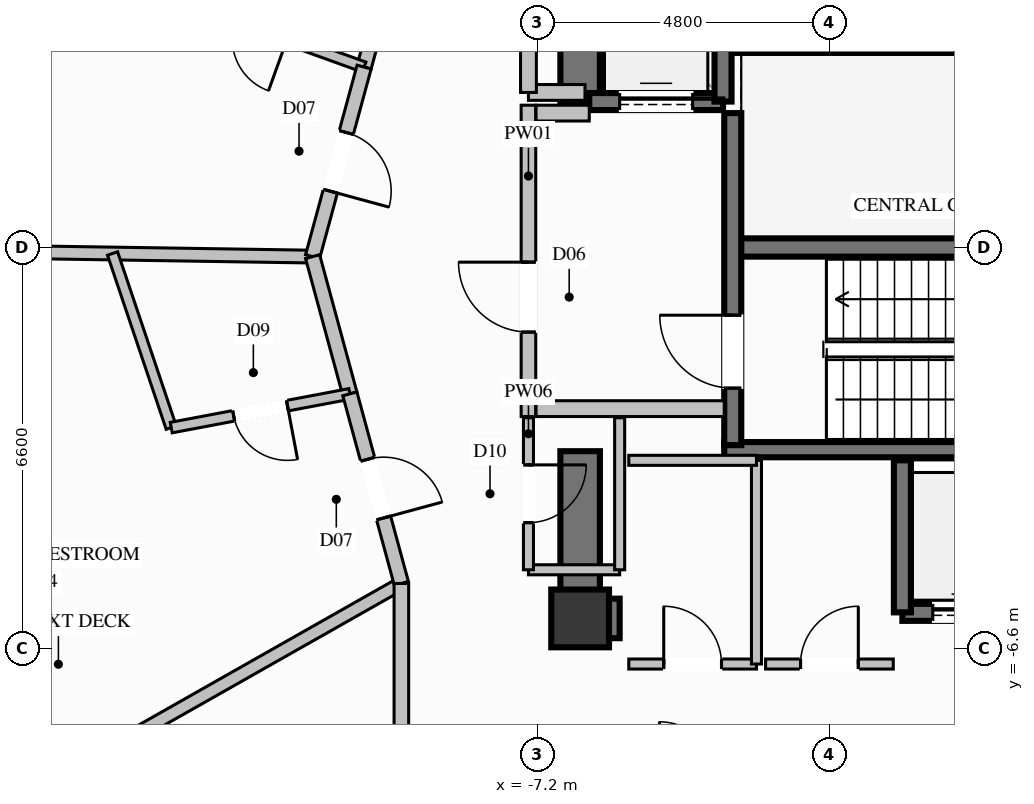
"""IFC4 building model, lengths in metres.
Left out: names, types, materials, properties, quantities, classifications, styles, units other than length and angle.
Written with IfcOpenShell. Run it as: python <this file> out.ifc"""

import sys

from ifc_helpers import new_model, si_unit, direction, frame, frame_2d, origin, origin_2d, place, context, subcontext, project, spatial, rectangle, extrude, element, fill, save


model = new_model("IFC4")
c1 = context("Model", 3, precision=1e-05, world=origin(), true_north=direction((0.0, 1.0)))
c2 = subcontext(c1, "Body", "Model", "MODEL_VIEW")
j1 = project(units=[si_unit("LENGTHUNIT", "METRE"), si_unit("PLANEANGLEUNIT", "RADIAN")], contexts=[c1])
p1 = place(None, origin())
s1 = spatial("IfcSite", under=j1, at=p1, CompositionType="ELEMENT")
p2 = place(p1, origin())
s2 = spatial("IfcBuilding", under=s1, at=p2, CompositionType="ELEMENT")
p3 = place(p2, frame((0.0, 0.0, 149.4)))
s3 = spatial("IfcBuildingStorey", under=s2, at=p3, CompositionType="ELEMENT", Elevation=149.4)
p4 = place(p3, frame((-6.5, -6.1, 0.0), z_axis=(0.0, 0.0, 1.0), x_axis=(1.0, 0.0, 0.0)))
e1 = element("IfcColumn", 1, at=p4, inside=s3, PredefinedType="COLUMN", context=c2, shape_type="SweptSolid", body=[
    extrude(rectangle(XDim=0.95, YDim=0.95, at=origin_2d()), origin(), (0.0, 0.0, 1.0), 3.6),
])
p5 = place(p3, frame((-3.99, 0.0, 0.0), z_axis=(0.0, 0.0, 1.0), x_axis=(1.0, 0.0, 0.0)))
e2 = element("IfcWall", 2, at=p5, inside=s3, PredefinedType="SHEAR", context=c2, shape_type="SweptSolid", body=[
    extrude(rectangle(XDim=7.98, YDim=0.3, at=frame_2d((3.99, 0.0))), origin(), (0.0, 0.0, 1.0), 3.6),
])
for number, where, z_axis, x_axis in (
    (3, (-4.13, -3.325, 0.0), (0.0, 0.0, 1.0), (1.0, 0.0, 0.0)),
    (4, (-4.13, 3.325, 0.0), (0.0, 0.0, 1.0), (1.0, 0.0, 0.0)),
):
    element("IfcWall", number, at=place(p3, frame(where, z_axis=z_axis, x_axis=x_axis)), inside=s3, PredefinedType="SOLIDWALL", context=c2, shape_type="SweptSolid", body=[
        extrude(rectangle(XDim=8.26, YDim=0.25, at=frame_2d((4.13, 0.0))), origin(), (0.0, 0.0, 1.0), 3.6),
    ])
p6 = place(p3, frame((-6.175, -6.1, 0.0), z_axis=(0.0, 0.0, 1.0), x_axis=(1.0, 0.0, 0.0)))
e5 = element("IfcWall", 5, at=p6, inside=s3, PredefinedType="SHEAR", context=c2, shape_type="SweptSolid", body=[
    extrude(rectangle(XDim=0.325, YDim=0.65, at=frame_2d((0.163, 0.0))), origin(), (0.0, 0.0, 1.0), 3.6),
])
p7 = place(p3, frame((-6.5, 2.35, 0.0), z_axis=(0.0, 0.0, 1.0), x_axis=(0.0, 1.0, 0.0)))
e6 = element("IfcWall", 6, at=p7, inside=s3, PredefinedType="SHEAR", context=c2, shape_type="SweptSolid", body=[
    extrude(rectangle(XDim=4.075, YDim=0.65, at=frame_2d((2.038, 0.0))), origin(), (0.0, 0.0, 1.0), 3.6),
])
p8 = place(p3, frame((-6.5, -6.425, 0.0), z_axis=(0.0, 0.0, 1.0), x_axis=(0.0, 1.0, 0.0)))
e7 = element("IfcWall", 7, at=p8, inside=s3, PredefinedType="SHEAR", context=c2, shape_type="SweptSolid", body=[
    extrude(rectangle(XDim=3.075, YDim=0.65, at=frame_2d((1.538, 0.0))), origin(), (0.0, 0.0, 1.0), 3.6),
])
p9 = place(p3, frame((-1.2, -6.0, 0.0), z_axis=(0.0, 0.0, 1.0), x_axis=(1.0, 0.0, 0.0)))
e8 = element("IfcWall", 8, at=p9, inside=s3, PredefinedType="SOLIDWALL", context=c2, shape_type="SweptSolid", body=[
    extrude(rectangle(XDim=2.1, YDim=0.28, at=frame_2d((1.05, 0.0))), origin(), (0.0, 0.0, 1.0), 3.35),
])
p10 = place(p9, frame((0.5, 0.0, 0.0)))
e9 = element("IfcOpeningElement", 9, at=p10, cuts=e8, PredefinedType="OPENING", context=c2, shape_type="SweptSolid", body=[
    extrude(rectangle(XDim=1.1, YDim=2.2, at=frame_2d((0.55, 1.1))), frame((0.0, 0.15, 0.0), z_axis=(0.0, -1.0, 0.0), x_axis=(1.0, 0.0, 0.0)), (0.0, 0.0, 1.0), 0.3),
])
p11 = place(p3, frame((-1.2, -3.5, 0.0), z_axis=(0.0, 0.0, 1.0), x_axis=(0.0, -1.0, 0.0)))
e10 = element("IfcWall", 10, at=p11, inside=s3, PredefinedType="SOLIDWALL", context=c2, shape_type="SweptSolid", body=[
    extrude(rectangle(XDim=2.5, YDim=0.28, at=frame_2d((1.25, 0.0))), origin(), (0.0, 0.0, 1.0), 3.35),
])
p12 = place(p3, frame((-6.35, 2.4, 0.0), z_axis=(0.0, 0.0, 1.0), x_axis=(1.0, 0.0, 0.0)))
e11 = element("IfcWall", 11, at=p12, inside=s3, PredefinedType="SOLIDWALL", context=c2, shape_type="SweptSolid", body=[
    extrude(rectangle(XDim=2.2, YDim=0.28, at=frame_2d((1.1, 0.0))), origin(), (0.0, 0.0, 1.0), 3.35),
])
p13 = place(p12, frame((0.5, 0.0, 0.0)))
e12 = element("IfcOpeningElement", 12, at=p13, cuts=e11, PredefinedType="OPENING", context=c2, shape_type="SweptSolid", body=[
    extrude(rectangle(XDim=1.2, YDim=2.2, at=frame_2d((0.6, 1.1))), frame((0.0, 0.15, 0.0), z_axis=(0.0, -1.0, 0.0), x_axis=(1.0, 0.0, 0.0)), (0.0, 0.0, 1.0), 0.3),
])
p14 = place(p3, frame((-4.15, 2.4, 0.0), z_axis=(0.0, 0.0, 1.0), x_axis=(0.0, 1.0, 0.0)))
e13 = element("IfcWall", 13, at=p14, inside=s3, PredefinedType="SOLIDWALL", context=c2, shape_type="SweptSolid", body=[
    extrude(rectangle(XDim=2.7, YDim=0.28, at=frame_2d((1.35, 0.0))), origin(), (0.0, 0.0, 1.0), 3.35),
])
p15 = place(p3, frame((-3.99, -3.25, 0.0), z_axis=(0.0, 0.0, 1.0), x_axis=(0.0, 1.0, 0.0)))
e14 = element("IfcWall", 14, at=p15, inside=s3, PredefinedType="SOLIDWALL", context=c2, shape_type="SweptSolid", body=[
    extrude(rectangle(XDim=5.46, YDim=0.28, at=frame_2d((2.73, 0.0))), origin(), (0.0, 0.0, 1.0), 3.35),
])
p16 = place(p15, frame((0.937, 0.0, 0.0)))
e15 = element("IfcOpeningElement", 15, at=p16, cuts=e14, PredefinedType="OPENING", context=c2, shape_type="SweptSolid", body=[
    extrude(rectangle(XDim=1.2, YDim=2.2, at=frame_2d((0.6, 1.1))), frame((0.0, 0.15, 0.0), z_axis=(0.0, -1.0, 0.0), x_axis=(1.0, 0.0, 0.0)), (0.0, 0.0, 1.0), 0.3),
])
p17 = place(p3, frame((-7.35, -2.78, 0.0), z_axis=(0.0, 0.0, 1.0), x_axis=(0.0, 1.0, 0.0)))
e16 = element("IfcWall", 16, at=p17, inside=s3, PredefinedType="PARTITIONING", context=c2, shape_type="SweptSolid", body=[
    extrude(rectangle(XDim=5.12, YDim=0.24, at=frame_2d((2.56, 0.0))), origin(), (0.0, 0.0, 1.0), 2.435),
])
p18 = place(p17, frame((1.389, 0.0, 0.0)))
e17 = element("IfcOpeningElement", 17, at=p18, cuts=e16, PredefinedType="OPENING", context=c2, shape_type="SweptSolid", body=[
    extrude(rectangle(XDim=1.15, YDim=2.2, at=frame_2d((0.575, 1.1))), frame((0.0, 0.13, 0.0), z_axis=(0.0, -1.0, 0.0), x_axis=(1.0, 0.0, 0.0)), (0.0, 0.0, 1.0), 0.26),
])
p19 = place(p3, frame((-7.225, -2.65, 0.0), z_axis=(0.0, 0.0, 1.0), x_axis=(1.0, 0.0, 0.0)))
e18 = element("IfcWall", 18, at=p19, inside=s3, PredefinedType="PARTITIONING", context=c2, shape_type="SweptSolid", body=[
    extrude(rectangle(XDim=3.095, YDim=0.26, at=frame_2d((1.548, 0.0))), origin(), (0.0, 0.0, 1.0), 3.35),
])
p20 = place(p3, frame((-7.225, 2.21, 0.0), z_axis=(0.0, 0.0, 1.0), x_axis=(1.0, 0.0, 0.0)))
e19 = element("IfcWall", 19, at=p20, inside=s3, PredefinedType="PARTITIONING", context=c2, shape_type="SweptSolid", body=[
    extrude(rectangle(XDim=0.875, YDim=0.26, at=frame_2d((0.438, 0.0))), origin(), (0.0, 0.0, 1.0), 3.35),
])
p21 = place(p3, frame((-7.35, 2.55, 0.0), z_axis=(0.0, 0.0, 1.0), x_axis=(1.0, 0.0, 0.0)))
e20 = element("IfcWall", 20, at=p21, inside=s3, PredefinedType="PARTITIONING", context=c2, shape_type="SweptSolid", body=[
    extrude(rectangle(XDim=0.93, YDim=0.26, at=frame_2d((0.465, 0.0))), origin(), (0.0, 0.0, 1.0), 3.35),
])
p22 = place(p3, frame((-7.35, 2.55, 0.0), z_axis=(0.0, 0.0, 1.0), x_axis=(0.0, 1.0, 0.0)))
e21 = element("IfcWall", 21, at=p22, inside=s3, PredefinedType="PARTITIONING", context=c2, shape_type="SweptSolid", body=[
    extrude(rectangle(XDim=2.4, YDim=0.26, at=frame_2d((1.2, 0.0))), origin(), (0.0, 0.0, 1.0), 2.435),
])
p23 = place(p22, frame((0.775, 0.0, 0.0)))
e22 = element("IfcOpeningElement", 22, at=p23, cuts=e21, PredefinedType="OPENING", context=c2, shape_type="SweptSolid", body=[
    extrude(rectangle(XDim=0.85, YDim=2.05, at=frame_2d((0.425, 1.025))), frame((0.0, 0.14, 0.0), z_axis=(0.0, -1.0, 0.0), x_axis=(1.0, 0.0, 0.0)), (0.0, 0.0, 1.0), 0.28),
])
p24 = place(p3, frame((-7.35, -5.3, 0.0), z_axis=(0.0, 0.0, 1.0), x_axis=(1.0, 0.0, 0.0)))
e23 = element("IfcWall", 23, at=p24, inside=s3, PredefinedType="PARTITIONING", context=c2, shape_type="SweptSolid", body=[
    extrude(rectangle(XDim=1.5, YDim=0.165, at=frame_2d((0.75, 0.0))), origin(), (0.0, 0.0, 1.0), 2.435),
])
p25 = place(p3, frame((-5.85, -5.3, 0.0), z_axis=(0.0, 0.0, 1.0), x_axis=(0.0, 1.0, 0.0)))
e24 = element("IfcWall", 24, at=p25, inside=s3, PredefinedType="PARTITIONING", context=c2, shape_type="SweptSolid", body=[
    extrude(rectangle(XDim=2.5, YDim=0.165, at=frame_2d((1.25, 0.0))), origin(), (0.0, 0.0, 1.0), 2.435),
])
p26 = place(p3, frame((-7.35, -2.8, 0.0), z_axis=(0.0, 0.0, 1.0), x_axis=(0.0, -1.0, 0.0)))
e25 = element("IfcWall", 25, at=p26, inside=s3, PredefinedType="PARTITIONING", context=c2, shape_type="SweptSolid", body=[
    extrude(rectangle(XDim=2.5, YDim=0.165, at=frame_2d((1.25, 0.0))), origin(), (0.0, 0.0, 1.0), 3.35),
])
p27 = place(p26, frame((0.775, 0.0, 0.0)))
e26 = element("IfcOpeningElement", 26, at=p27, cuts=e25, PredefinedType="OPENING", context=c2, shape_type="SweptSolid", body=[
    extrude(rectangle(XDim=0.95, YDim=2.1, at=frame_2d((0.475, 1.05))), frame((0.0, 0.093, 0.0), z_axis=(0.0, -1.0, 0.0), x_axis=(1.0, 0.0, 0.0)), (0.0, 0.0, 1.0), 0.185),
])
p28 = place(p3, frame((-5.7, -6.85, 0.0), z_axis=(0.0, 0.0, 1.0), x_axis=(1.0, 0.0, 0.0)))
e27 = element("IfcWall", 27, at=p28, inside=s3, PredefinedType="PARTITIONING", context=c2, shape_type="SweptSolid", body=[
    extrude(rectangle(XDim=2.1, YDim=0.165, at=frame_2d((1.05, 0.0))), origin(), (0.0, 0.0, 1.0), 2.435),
])
p29 = place(p28, frame((0.575, 0.0, 0.0)))
e28 = element("IfcOpeningElement", 28, at=p29, cuts=e27, PredefinedType="OPENING", context=c2, shape_type="SweptSolid", body=[
    extrude(rectangle(XDim=0.95, YDim=2.1, at=frame_2d((0.475, 1.05))), frame((0.0, 0.093, 0.0), z_axis=(0.0, -1.0, 0.0), x_axis=(1.0, 0.0, 0.0)), (0.0, 0.0, 1.0), 0.185),
])
p30 = place(p3, frame((-3.6, -6.85, 0.0), z_axis=(0.0, 0.0, 1.0), x_axis=(0.0, 1.0, 0.0)))
e29 = element("IfcWall", 29, at=p30, inside=s3, PredefinedType="PARTITIONING", context=c2, shape_type="SweptSolid", body=[
    extrude(rectangle(XDim=3.35, YDim=0.165, at=frame_2d((1.675, 0.0))), origin(), (0.0, 0.0, 1.0), 3.35),
])
p31 = place(p3, frame((-3.6, -3.5, 0.0), z_axis=(0.0, 0.0, 1.0), x_axis=(-1.0, 0.0, 0.0)))
e30 = element("IfcWall", 30, at=p31, inside=s3, PredefinedType="PARTITIONING", context=c2, shape_type="SweptSolid", body=[
    extrude(rectangle(XDim=2.1, YDim=0.165, at=frame_2d((1.05, 0.0))), origin(), (0.0, 0.0, 1.0), 3.35),
])
p32 = place(p3, frame((-3.45, -6.85, 0.0), z_axis=(0.0, 0.0, 1.0), x_axis=(1.0, 0.0, 0.0)))
e31 = element("IfcWall", 31, at=p32, inside=s3, PredefinedType="PARTITIONING", context=c2, shape_type="SweptSolid", body=[
    extrude(rectangle(XDim=2.1, YDim=0.165, at=frame_2d((1.05, 0.0))), origin(), (0.0, 0.0, 1.0), 2.435),
])
p33 = place(p32, frame((0.575, 0.0, 0.0)))
e32 = element("IfcOpeningElement", 32, at=p33, cuts=e31, PredefinedType="OPENING", context=c2, shape_type="SweptSolid", body=[
    extrude(rectangle(XDim=0.95, YDim=2.1, at=frame_2d((0.475, 1.05))), frame((0.0, 0.093, 0.0), z_axis=(0.0, -1.0, 0.0), x_axis=(1.0, 0.0, 0.0)), (0.0, 0.0, 1.0), 0.185),
])
p34 = place(p3, frame((-10.9, -0.15, 0.0), z_axis=(0.0, 0.0, 1.0), x_axis=(-0.999880532043, 0.01545709035, 0.0)))
e33 = element("IfcWall", 33, at=p34, inside=s3, PredefinedType="PARTITIONING", context=c2, shape_type="SweptSolid", body=[
    extrude(rectangle(XDim=5.56, YDim=0.21, at=frame_2d((2.78, 0.0))), origin(), (0.0, 0.0, 1.0), 3.35),
])
p35 = place(p3, frame((-9.44, -5.525, 0.0), z_axis=(0.0, 0.0, 1.0), x_axis=(-0.86993170577, -0.493172208561, 0.0)))
e34 = element("IfcWall", 34, at=p35, inside=s3, PredefinedType="PARTITIONING", context=c2, shape_type="SweptSolid", body=[
    extrude(rectangle(XDim=5.518, YDim=0.21, at=frame_2d((2.759, 0.0))), origin(), (0.0, 0.0, 1.0), 2.717),
])
p36 = place(p3, frame((-9.44, 5.225, 0.0), z_axis=(0.0, 0.0, 1.0), x_axis=(-0.262004776073, -0.965066576623, 0.0)))
e35 = element("IfcWall", 35, at=p36, inside=s3, PredefinedType="PARTITIONING", context=c2, shape_type="SweptSolid", body=[
    extrude(rectangle(XDim=2.34, YDim=0.24, at=frame_2d((1.17, 0.0))), origin(), (0.0, 0.0, 1.0), 3.35),
])
p37 = place(p3, frame((-10.053, 2.967, 0.0), z_axis=(0.0, 0.0, 1.0), x_axis=(-0.940696709382, 0.339248730223, 0.0)))
e36 = element("IfcWall", 36, at=p37, inside=s3, PredefinedType="PLUMBINGWALL", context=c2, shape_type="SweptSolid", body=[
    extrude(rectangle(XDim=3.593, YDim=0.175, at=frame_2d((1.797, 0.0))), origin(), (0.0, 0.0, 1.0), 3.35),
])
p38 = place(p37, frame((1.347, 0.0, 0.0)))
e37 = element("IfcOpeningElement", 37, at=p38, cuts=e36, PredefinedType="OPENING", context=c2, shape_type="SweptSolid", body=[
    extrude(rectangle(XDim=0.9, YDim=2.1, at=frame_2d((0.45, 1.05))), frame((0.0, 0.098, 0.0), z_axis=(0.0, -1.0, 0.0), x_axis=(1.0, 0.0, 0.0)), (0.0, 0.0, 1.0), 0.195),
])
p39 = place(p3, frame((-10.053, 2.967, 0.0), z_axis=(0.0, 0.0, 1.0), x_axis=(-0.262209089996, -0.965011084456, 0.0)))
e38 = element("IfcWall", 38, at=p39, inside=s3, PredefinedType="PARTITIONING", context=c2, shape_type="SweptSolid", body=[
    extrude(rectangle(XDim=3.23, YDim=0.24, at=frame_2d((1.615, 0.0))), origin(), (0.0, 0.0, 1.0), 3.35),
])
p40 = place(p39, frame((1.115, 0.0, 0.0)))
e39 = element("IfcOpeningElement", 39, at=p40, cuts=e38, PredefinedType="OPENING", context=c2, shape_type="SweptSolid", body=[
    extrude(rectangle(XDim=1.0, YDim=2.2, at=frame_2d((0.5, 1.1))), frame((0.0, 0.13, 0.0), z_axis=(0.0, -1.0, 0.0), x_axis=(1.0, 0.0, 0.0)), (0.0, 0.0, 1.0), 0.26),
])
p41 = place(p3, frame((-10.9, -0.15, 0.0), z_axis=(0.0, 0.0, 1.0), x_axis=(0.262013132791, -0.965064307829, 0.0)))
e40 = element("IfcWall", 40, at=p41, inside=s3, PredefinedType="PARTITIONING", context=c2, shape_type="SweptSolid", body=[
    extrude(rectangle(XDim=2.339, YDim=0.24, at=frame_2d((1.169, 0.0))), origin(), (0.0, 0.0, 1.0), 3.35),
])
p42 = place(p3, frame((-14.19, -0.099, 0.0), z_axis=(0.0, 0.0, 1.0), x_axis=(0.319377775225, -0.947627477806, 0.0)))
e41 = element("IfcWall", 41, at=p42, inside=s3, PredefinedType="PLUMBINGWALL", context=c2, shape_type="SweptSolid", body=[
    extrude(rectangle(XDim=3.021, YDim=0.175, at=frame_2d((1.51, 0.0))), origin(), (0.0, 0.0, 1.0), 3.35),
])
p43 = place(p3, frame((-10.287, -2.407, 0.0), z_axis=(0.0, 0.0, 1.0), x_axis=(-0.982625425388, -0.185599766653, 0.0)))
e42 = element("IfcWall", 42, at=p43, inside=s3, PredefinedType="PLUMBINGWALL", context=c2, shape_type="SweptSolid", body=[
    extrude(rectangle(XDim=2.99, YDim=0.175, at=frame_2d((1.495, 0.0))), origin(), (0.0, 0.0, 1.0), 3.35),
])
p44 = place(p43, frame((1.045, 0.0, 0.0)))
e43 = element("IfcOpeningElement", 43, at=p44, cuts=e42, PredefinedType="OPENING", context=c2, shape_type="SweptSolid", body=[
    extrude(rectangle(XDim=0.9, YDim=2.1, at=frame_2d((0.45, 1.05))), frame((0.0, 0.098, 0.0), z_axis=(0.0, -1.0, 0.0), x_axis=(1.0, 0.0, 0.0)), (0.0, 0.0, 1.0), 0.195),
])
p45 = place(p3, frame((-10.287, -2.407, 0.0), z_axis=(0.0, 0.0, 1.0), x_axis=(0.262202977539, -0.965012745289, 0.0)))
e44 = element("IfcWall", 44, at=p45, inside=s3, PredefinedType="PARTITIONING", context=c2, shape_type="SweptSolid", body=[
    extrude(rectangle(XDim=3.231, YDim=0.24, at=frame_2d((1.615, 0.0))), origin(), (0.0, 0.0, 1.0), 3.35),
])
p46 = place(p45, frame((1.115, 0.0, 0.0)))
e45 = element("IfcOpeningElement", 45, at=p46, cuts=e44, PredefinedType="OPENING", context=c2, shape_type="SweptSolid", body=[
    extrude(rectangle(XDim=1.0, YDim=2.2, at=frame_2d((0.5, 1.1))), frame((0.0, 0.13, 0.0), z_axis=(0.0, -1.0, 0.0), x_axis=(1.0, 0.0, 0.0)), (0.0, 0.0, 1.0), 0.26),
])
p47 = place(p3, frame((-9.44, -5.525, 0.0), z_axis=(0.0, 0.0, 1.0), x_axis=(0.0, -1.0, 0.0)))
e46 = element("IfcWall", 46, at=p47, inside=s3, PredefinedType="PARTITIONING", context=c2, shape_type="SweptSolid", body=[
    extrude(rectangle(XDim=3.225, YDim=0.24, at=frame_2d((1.613, 0.0))), origin(), (0.0, 0.0, 1.0), 3.35),
])
p48 = place(p10, origin())
e47 = element("IfcDoor", 47, at=p48, inside=s3, OperationType="SLIDING_TO_LEFT", PredefinedType="DOOR", context=c2, shape_type="SweptSolid", body=[
    extrude(rectangle(XDim=1.1, YDim=2.2, at=frame_2d((0.55, 1.1))), frame((0.0, 0.025, 0.0), z_axis=(0.0, -1.0, 0.0), x_axis=(1.0, 0.0, 0.0)), (0.0, 0.0, 1.0), 0.05),
])
fill(e9, e47)
p49 = place(p13, origin())
e48 = element("IfcDoor", 48, at=p49, inside=s3, OperationType="SLIDING_TO_LEFT", PredefinedType="DOOR", context=c2, shape_type="SweptSolid", body=[
    extrude(rectangle(XDim=1.2, YDim=2.2, at=frame_2d((0.6, 1.1))), frame((0.0, 0.025, 0.0), z_axis=(0.0, -1.0, 0.0), x_axis=(1.0, 0.0, 0.0)), (0.0, 0.0, 1.0), 0.05),
])
fill(e12, e48)
p50 = place(p16, origin())
e49 = element("IfcDoor", 49, at=p50, inside=s3, OperationType="SINGLE_SWING_RIGHT", PredefinedType="DOOR", context=c2, shape_type="SweptSolid", body=[
    extrude(rectangle(XDim=1.2, YDim=2.2, at=frame_2d((0.6, 1.1))), frame((0.0, 0.025, 0.0), z_axis=(0.0, -1.0, 0.0), x_axis=(1.0, 0.0, 0.0)), (0.0, 0.0, 1.0), 0.05),
])
fill(e15, e49)
p51 = place(p18, origin())
e50 = element("IfcDoor", 50, at=p51, inside=s3, OperationType="SINGLE_SWING_RIGHT", PredefinedType="DOOR", context=c2, shape_type="SweptSolid", body=[
    extrude(rectangle(XDim=1.15, YDim=2.2, at=frame_2d((0.575, 1.1))), frame((0.0, 0.025, 0.0), z_axis=(0.0, -1.0, 0.0), x_axis=(1.0, 0.0, 0.0)), (0.0, 0.0, 1.0), 0.05),
])
fill(e17, e50)
p52 = place(p27, origin())
e51 = element("IfcDoor", 51, at=p52, inside=s3, OperationType="SINGLE_SWING_LEFT", PredefinedType="DOOR", context=c2, shape_type="SweptSolid", body=[
    extrude(rectangle(XDim=0.95, YDim=2.1, at=frame_2d((0.475, 1.05))), frame((0.0, 0.025, 0.0), z_axis=(0.0, -1.0, 0.0), x_axis=(1.0, 0.0, 0.0)), (0.0, 0.0, 1.0), 0.05),
])
fill(e26, e51)
p53 = place(p29, origin())
e52 = element("IfcDoor", 52, at=p53, inside=s3, OperationType="SINGLE_SWING_LEFT", PredefinedType="DOOR", context=c2, shape_type="SweptSolid", body=[
    extrude(rectangle(XDim=0.95, YDim=2.1, at=frame_2d((0.475, 1.05))), frame((0.0, 0.025, 0.0), z_axis=(0.0, -1.0, 0.0), x_axis=(1.0, 0.0, 0.0)), (0.0, 0.0, 1.0), 0.05),
])
fill(e28, e52)
p54 = place(p33, origin())
e53 = element("IfcDoor", 53, at=p54, inside=s3, OperationType="SINGLE_SWING_RIGHT", PredefinedType="DOOR", context=c2, shape_type="SweptSolid", body=[
    extrude(rectangle(XDim=0.95, YDim=2.1, at=frame_2d((0.475, 1.05))), frame((0.0, 0.025, 0.0), z_axis=(0.0, -1.0, 0.0), x_axis=(1.0, 0.0, 0.0)), (0.0, 0.0, 1.0), 0.05),
])
fill(e32, e53)
p55 = place(p40, origin())
e54 = element("IfcDoor", 54, at=p55, inside=s3, OperationType="SINGLE_SWING_RIGHT", PredefinedType="DOOR", context=c2, shape_type="SweptSolid", body=[
    extrude(rectangle(XDim=1.0, YDim=2.2, at=frame_2d((0.5, 1.1))), frame((0.0, 0.025, 0.0), z_axis=(0.0, -1.0, 0.0), x_axis=(1.0, 0.0, 0.0)), (0.0, 0.0, 1.0), 0.05),
])
fill(e39, e54)
p56 = place(p44, origin())
e55 = element("IfcDoor", 55, at=p56, inside=s3, OperationType="SINGLE_SWING_LEFT", PredefinedType="DOOR", context=c2, shape_type="SweptSolid", body=[
    extrude(rectangle(XDim=0.9, YDim=2.1, at=frame_2d((0.45, 1.05))), frame((0.0, 0.025, 0.0), z_axis=(0.0, -1.0, 0.0), x_axis=(1.0, 0.0, 0.0)), (0.0, 0.0, 1.0), 0.05),
])
fill(e43, e55)
p57 = place(p46, origin())
e56 = element("IfcDoor", 56, at=p57, inside=s3, OperationType="SINGLE_SWING_RIGHT", PredefinedType="DOOR", context=c2, shape_type="SweptSolid", body=[
    extrude(rectangle(XDim=1.0, YDim=2.2, at=frame_2d((0.5, 1.1))), frame((0.0, 0.025, 0.0), z_axis=(0.0, -1.0, 0.0), x_axis=(1.0, 0.0, 0.0)), (0.0, 0.0, 1.0), 0.05),
])
fill(e45, e56)
save(model, sys.argv[1])
